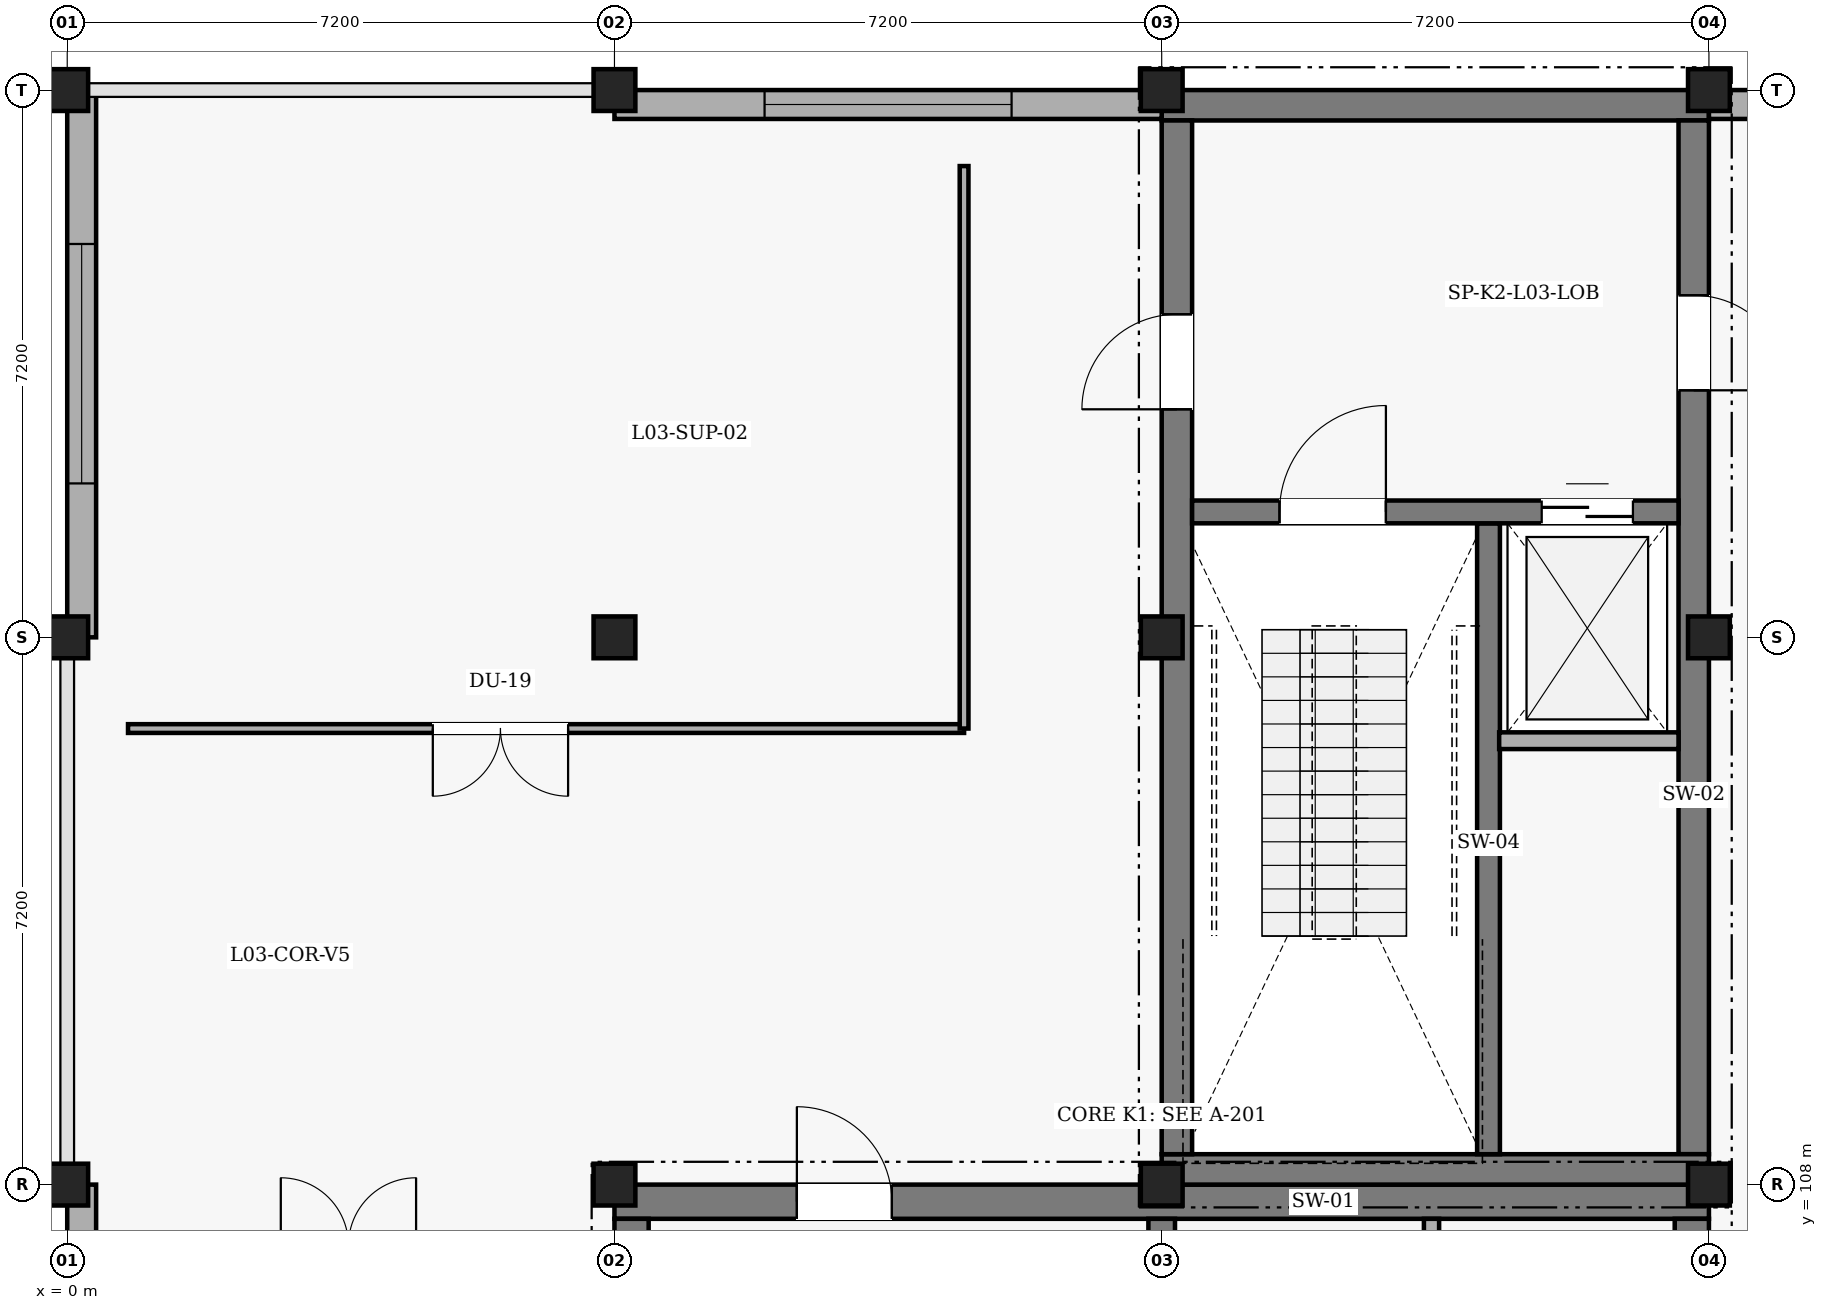
"""IFC4 building model, lengths in metres.
Left out: names, types, materials, properties, quantities, classifications, styles, units other than length and angle.
Written with IfcOpenShell. Run it as: python <this file> out.ifc"""

import sys

from ifc_helpers import new_model, si_unit, direction, frame, frame_2d, origin, origin_2d, place, context, subcontext, project, spatial, rectangle, extrude, element, fill, save


model = new_model("IFC4")
c1 = context("Model", 3, precision=1e-05, world=origin(), true_north=direction((0.0, 1.0)))
c2 = subcontext(c1, "Body", "Model", "MODEL_VIEW")
j1 = project(units=[si_unit("LENGTHUNIT", "METRE"), si_unit("PLANEANGLEUNIT", "RADIAN")], contexts=[c1])
p1 = place(None, origin())
s1 = spatial("IfcSite", under=j1, at=p1, CompositionType="ELEMENT")
p2 = place(p1, origin())
s2 = spatial("IfcBuilding", under=s1, at=p2, CompositionType="ELEMENT")
p3 = place(p2, frame((0.0, 0.0, 13.8)))
s3 = spatial("IfcBuildingStorey", under=s2, at=p3, CompositionType="ELEMENT", Elevation=13.8)
p4 = place(p3, frame((7.2, 107.775, 0.0), z_axis=(0.0, 0.0, 1.0), x_axis=(1.0, 0.0, 0.0)))
e1 = element("IfcWall", 1, at=p4, inside=s3, PredefinedType="SHEAR", context=c2, shape_type="SweptSolid", body=[
    extrude(rectangle(XDim=14.4, YDim=0.45, at=frame_2d((7.2, 0.0))), origin(), (0.0, 0.0, 1.0), 4.2),
])
p5 = place(p4, frame((2.4, 0.0, 0.0)))
e2 = element("IfcOpeningElement", 2, at=p5, cuts=e1, PredefinedType="OPENING", context=c2, shape_type="SweptSolid", body=[
    extrude(rectangle(XDim=1.25, YDim=2.2, at=frame_2d((0.625, 1.1))), frame((0.0, 0.235, 0.0), z_axis=(0.0, -1.0, 0.0), x_axis=(1.0, 0.0, 0.0)), (0.0, 0.0, 1.0), 0.47),
])
p6 = place(p3, frame((21.375, 107.55, 0.0), z_axis=(0.0, 0.0, 1.0), x_axis=(0.0, -1.0, 0.0)))
e3 = element("IfcWall", 3, at=p6, inside=s3, PredefinedType="SHEAR", context=c2, shape_type="SweptSolid", body=[
    extrude(rectangle(XDim=13.5, YDim=0.45, at=frame_2d((6.75, 0.0))), origin(), (0.0, 0.0, 1.0), 4.2),
])
p7 = place(p6, frame((9.8, 0.0, 0.0)))
e4 = element("IfcOpeningElement", 4, at=p7, cuts=e3, PredefinedType="OPENING", context=c2, shape_type="SweptSolid", body=[
    extrude(rectangle(XDim=1.0, YDim=2.15, at=frame_2d((0.5, 1.075))), frame((0.0, 0.235, 0.0), z_axis=(0.0, -1.0, 0.0), x_axis=(1.0, 0.0, 0.0)), (0.0, 0.0, 1.0), 0.47),
])
p8 = place(p6, frame((2.3, 0.0, 0.0)))
e5 = element("IfcOpeningElement", 5, at=p8, cuts=e3, PredefinedType="OPENING", context=c2, shape_type="SweptSolid", body=[
    extrude(rectangle(XDim=1.25, YDim=2.2, at=frame_2d((0.625, 1.1))), frame((0.0, 0.235, 0.0), z_axis=(0.0, -1.0, 0.0), x_axis=(1.0, 0.0, 0.0)), (0.0, 0.0, 1.0), 0.47),
])
p9 = place(p3, frame((7.425, 94.05, 0.0), z_axis=(0.0, 0.0, 1.0), x_axis=(0.0, 1.0, 0.0)))
e6 = element("IfcWall", 6, at=p9, inside=s3, PredefinedType="SHEAR", context=c2, shape_type="SweptSolid", body=[
    extrude(rectangle(XDim=13.5, YDim=0.45, at=frame_2d((6.75, 0.0))), origin(), (0.0, 0.0, 1.0), 4.2),
])
p10 = place(p3, frame((14.4, 107.55, 0.0), z_axis=(0.0, 0.0, 1.0), x_axis=(0.0, -1.0, 0.0)))
e7 = element("IfcWall", 7, at=p10, inside=s3, PredefinedType="SHEAR", context=c2, shape_type="SweptSolid", body=[
    extrude(rectangle(XDim=13.5, YDim=0.35, at=frame_2d((6.75, 0.0))), origin(), (0.0, 0.0, 1.0), 4.2),
])
p11 = place(p10, frame((1.4, 0.0, 0.0)))
e8 = element("IfcOpeningElement", 8, at=p11, cuts=e7, PredefinedType="OPENING", context=c2, shape_type="SweptSolid", body=[
    extrude(rectangle(XDim=1.25, YDim=2.2, at=frame_2d((0.625, 1.1))), frame((0.0, 0.185, 0.0), z_axis=(0.0, -1.0, 0.0), x_axis=(1.0, 0.0, 0.0)), (0.0, 0.0, 1.0), 0.37),
])
p12 = place(p3, frame((14.4, 122.2, 0.0), z_axis=(0.0, 0.0, 1.0), x_axis=(1.0, 0.0, 0.0)))
e9 = element("IfcWall", 9, at=p12, inside=s3, PredefinedType="SHEAR", context=c2, shape_type="SweptSolid", body=[
    extrude(rectangle(XDim=7.2, YDim=0.4, at=frame_2d((3.6, 0.0))), origin(), (0.0, 0.0, 1.0), 4.2),
])
p13 = place(p3, frame((21.4, 122.0, 0.0), z_axis=(0.0, 0.0, 1.0), x_axis=(0.0, -1.0, 0.0)))
e10 = element("IfcWall", 10, at=p13, inside=s3, PredefinedType="SHEAR", context=c2, shape_type="SweptSolid", body=[
    extrude(rectangle(XDim=13.6, YDim=0.4, at=frame_2d((6.8, 0.0))), origin(), (0.0, 0.0, 1.0), 4.2),
])
p14 = place(p13, frame((2.3, 0.0, 0.0)))
e11 = element("IfcOpeningElement", 11, at=p14, cuts=e10, PredefinedType="OPENING", context=c2, shape_type="SweptSolid", body=[
    extrude(rectangle(XDim=1.25, YDim=2.2, at=frame_2d((0.625, 1.1))), frame((0.0, 0.21, 0.0), z_axis=(0.0, -1.0, 0.0), x_axis=(1.0, 0.0, 0.0)), (0.0, 0.0, 1.0), 0.42),
])
p15 = place(p3, frame((21.6, 108.2, 0.0), z_axis=(0.0, 0.0, 1.0), x_axis=(-1.0, 0.0, 0.0)))
e12 = element("IfcWall", 12, at=p15, inside=s3, PredefinedType="SHEAR", context=c2, shape_type="SweptSolid", body=[
    extrude(rectangle(XDim=7.2, YDim=0.4, at=frame_2d((3.6, 0.0))), origin(), (0.0, 0.0, 1.0), 4.2),
])
p16 = place(p3, frame((14.6, 108.4, 0.0), z_axis=(0.0, 0.0, 1.0), x_axis=(0.0, 1.0, 0.0)))
e13 = element("IfcWall", 13, at=p16, inside=s3, PredefinedType="SHEAR", context=c2, shape_type="SweptSolid", body=[
    extrude(rectangle(XDim=13.6, YDim=0.4, at=frame_2d((6.8, 0.0))), origin(), (0.0, 0.0, 1.0), 4.2),
])
p17 = place(p16, frame((9.8, 0.0, 0.0)))
e14 = element("IfcOpeningElement", 14, at=p17, cuts=e13, PredefinedType="OPENING", context=c2, shape_type="SweptSolid", body=[
    extrude(rectangle(XDim=1.25, YDim=2.2, at=frame_2d((0.625, 1.1))), frame((0.0, 0.21, 0.0), z_axis=(0.0, -1.0, 0.0), x_axis=(1.0, 0.0, 0.0)), (0.0, 0.0, 1.0), 0.42),
])
p18 = place(p3, frame((18.7, 116.7, 0.0), z_axis=(0.0, 0.0, 1.0), x_axis=(0.0, -1.0, 0.0)))
e15 = element("IfcWall", 15, at=p18, inside=s3, PredefinedType="SHEAR", context=c2, shape_type="SweptSolid", body=[
    extrude(rectangle(XDim=8.3, YDim=0.3, at=frame_2d((4.15, 0.0))), origin(), (0.0, 0.0, 1.0), 4.2),
])
p19 = place(p3, frame((14.8, 116.85, 0.0), z_axis=(0.0, 0.0, 1.0), x_axis=(1.0, 0.0, 0.0)))
e16 = element("IfcWall", 16, at=p19, inside=s3, PredefinedType="SHEAR", context=c2, shape_type="SweptSolid", body=[
    extrude(rectangle(XDim=6.4, YDim=0.3, at=frame_2d((3.2, 0.0))), origin(), (0.0, 0.0, 1.0), 4.2),
])
p20 = place(p19, frame((1.15, 0.0, 0.0)))
e17 = element("IfcOpeningElement", 17, at=p20, cuts=e16, PredefinedType="OPENING", context=c2, shape_type="SweptSolid", body=[
    extrude(rectangle(XDim=1.4, YDim=2.2, at=frame_2d((0.7, 1.1))), frame((0.0, 0.16, 0.0), z_axis=(0.0, -1.0, 0.0), x_axis=(1.0, 0.0, 0.0)), (0.0, 0.0, 1.0), 0.32),
])
p21 = place(p19, frame((4.6, 0.0, 0.0)))
e18 = element("IfcOpeningElement", 18, at=p21, cuts=e16, PredefinedType="OPENING", context=c2, shape_type="SweptSolid", body=[
    extrude(rectangle(XDim=1.2, YDim=2.15, at=frame_2d((0.6, 1.075))), frame((0.0, 0.16, 0.0), z_axis=(0.0, -1.0, 0.0), x_axis=(1.0, 0.0, 0.0)), (0.0, 0.0, 1.0), 0.32),
])
for number, where, z_axis, x_axis in (
    (19, (0.0, 108.0, 0.0), (0.0, 0.0, 1.0), (1.0, 0.0, 0.0)),
    (20, (0.0, 115.2, 0.0), (0.0, 0.0, 1.0), (1.0, 0.0, 0.0)),
    (21, (0.0, 122.4, 0.0), (0.0, 0.0, 1.0), (1.0, 0.0, 0.0)),
    (22, (7.2, 108.0, 0.0), (0.0, 0.0, 1.0), (1.0, 0.0, 0.0)),
    (23, (7.2, 115.2, 0.0), (0.0, 0.0, 1.0), (1.0, 0.0, 0.0)),
    (24, (7.2, 122.4, 0.0), (0.0, 0.0, 1.0), (1.0, 0.0, 0.0)),
    (25, (14.4, 108.0, 0.0), (0.0, 0.0, 1.0), (1.0, 0.0, 0.0)),
    (26, (14.4, 115.2, 0.0), (0.0, 0.0, 1.0), (1.0, 0.0, 0.0)),
    (27, (14.4, 122.4, 0.0), (0.0, 0.0, 1.0), (1.0, 0.0, 0.0)),
    (28, (21.6, 108.0, 0.0), (0.0, 0.0, 1.0), (1.0, 0.0, 0.0)),
    (29, (21.6, 115.2, 0.0), (0.0, 0.0, 1.0), (1.0, 0.0, 0.0)),
    (30, (21.6, 122.4, 0.0), (0.0, 0.0, 1.0), (1.0, 0.0, 0.0)),
):
    element("IfcColumn", number, at=place(p3, frame(where, z_axis=z_axis, x_axis=x_axis)), inside=s3, PredefinedType="COLUMN", context=c2, shape_type="SweptSolid", body=[
        extrude(rectangle(XDim=0.55, YDim=0.55, at=origin_2d()), origin(), (0.0, 0.0, 1.0), 3.9),
    ])
p22 = place(p3, frame((0.19, 100.8, 0.0), z_axis=(0.0, 0.0, 1.0), x_axis=(0.0, 1.0, 0.0)))
e31 = element("IfcWall", 31, at=p22, inside=s3, PredefinedType="SOLIDWALL", context=c2, shape_type="SweptSolid", body=[
    extrude(rectangle(XDim=7.2, YDim=0.38, at=frame_2d((3.6, 0.0))), origin(), (0.0, 0.0, 1.0), 3.6),
])
p23 = place(p22, frame((2.075, 0.0, 0.9)))
e32 = element("IfcOpeningElement", 32, at=p23, cuts=e31, PredefinedType="OPENING", context=c2, shape_type="SweptSolid", body=[
    extrude(rectangle(XDim=3.05, YDim=1.65, at=frame_2d((1.525, 0.825))), frame((0.0, 0.2, 0.0), z_axis=(0.0, -1.0, 0.0), x_axis=(1.0, 0.0, 0.0)), (0.0, 0.0, 1.0), 0.4),
])
p24 = place(p3, frame((0.19, 115.2, 0.0), z_axis=(0.0, 0.0, 1.0), x_axis=(0.0, 1.0, 0.0)))
e33 = element("IfcWall", 33, at=p24, inside=s3, PredefinedType="SOLIDWALL", context=c2, shape_type="SweptSolid", body=[
    extrude(rectangle(XDim=7.2, YDim=0.38, at=frame_2d((3.6, 0.0))), origin(), (0.0, 0.0, 1.0), 3.6),
])
p25 = place(p24, frame((2.025, 0.0, 0.9)))
e34 = element("IfcOpeningElement", 34, at=p25, cuts=e33, PredefinedType="OPENING", context=c2, shape_type="SweptSolid", body=[
    extrude(rectangle(XDim=3.15, YDim=1.7, at=frame_2d((1.575, 0.85))), frame((0.0, 0.2, 0.0), z_axis=(0.0, -1.0, 0.0), x_axis=(1.0, 0.0, 0.0)), (0.0, 0.0, 1.0), 0.4),
])
p26 = place(p3, frame((7.2, 122.21, 0.0), z_axis=(0.0, 0.0, 1.0), x_axis=(1.0, 0.0, 0.0)))
e35 = element("IfcWall", 35, at=p26, inside=s3, PredefinedType="SOLIDWALL", context=c2, shape_type="SweptSolid", body=[
    extrude(rectangle(XDim=7.2, YDim=0.38, at=frame_2d((3.6, 0.0))), origin(), (0.0, 0.0, 1.0), 3.6),
])
p27 = place(p26, frame((1.975, 0.0, 0.9)))
e36 = element("IfcOpeningElement", 36, at=p27, cuts=e35, PredefinedType="OPENING", context=c2, shape_type="SweptSolid", body=[
    extrude(rectangle(XDim=3.25, YDim=1.75, at=frame_2d((1.625, 0.875))), frame((0.0, 0.2, 0.0), z_axis=(0.0, -1.0, 0.0), x_axis=(1.0, 0.0, 0.0)), (0.0, 0.0, 1.0), 0.4),
])
p28 = place(p3, frame((21.6, 122.21, 0.0), z_axis=(0.0, 0.0, 1.0), x_axis=(1.0, 0.0, 0.0)))
e37 = element("IfcWall", 37, at=p28, inside=s3, PredefinedType="SOLIDWALL", context=c2, shape_type="SweptSolid", body=[
    extrude(rectangle(XDim=7.2, YDim=0.38, at=frame_2d((3.6, 0.0))), origin(), (0.0, 0.0, 1.0), 3.6),
])
p29 = place(p28, frame((1.925, 0.0, 0.9)))
e38 = element("IfcOpeningElement", 38, at=p29, cuts=e37, PredefinedType="OPENING", context=c2, shape_type="SweptSolid", body=[
    extrude(rectangle(XDim=3.35, YDim=1.8, at=frame_2d((1.675, 0.9))), frame((0.0, 0.2, 0.0), z_axis=(0.0, -1.0, 0.0), x_axis=(1.0, 0.0, 0.0)), (0.0, 0.0, 1.0), 0.4),
])
p30 = place(p3, frame((17.95, 102.56, 0.0), z_axis=(0.0, 0.0, 1.0), x_axis=(0.0, 1.0, 0.0)))
e39 = element("IfcWall", 39, at=p30, inside=s3, PredefinedType="PARTITIONING", context=c2, shape_type="SweptSolid", body=[
    extrude(rectangle(XDim=4.99, YDim=0.2, at=frame_2d((2.495, 0.0))), origin(), (0.0, 0.0, 1.0), 3.85),
])
p31 = place(p30, frame((1.6, 0.0, 0.0)))
e40 = element("IfcOpeningElement", 40, at=p31, cuts=e39, PredefinedType="OPENING", context=c2, shape_type="SweptSolid", body=[
    extrude(rectangle(XDim=1.25, YDim=2.2, at=frame_2d((0.625, 1.1))), frame((0.0, 0.11, 0.0), z_axis=(0.0, -1.0, 0.0), x_axis=(1.0, 0.0, 0.0)), (0.0, 0.0, 1.0), 0.22),
])
p32 = place(p3, frame((18.84, 113.84, 0.0), z_axis=(0.0, 0.0, 1.0), x_axis=(1.0, 0.0, 0.0)))
e41 = element("IfcWall", 41, at=p32, inside=s3, PredefinedType="PARTITIONING", context=c2, shape_type="SweptSolid", body=[
    extrude(rectangle(XDim=2.36, YDim=0.22, at=frame_2d((1.18, 0.0))), origin(), (0.0, 0.0, 1.0), 3.85),
])
p33 = place(p3, frame((11.8, 114.0, 0.0), z_axis=(0.0, 0.0, 1.0), x_axis=(-1.0, 0.0, 0.0)))
e42 = element("IfcWall", 42, at=p33, inside=s3, PredefinedType="PARTITIONING", context=c2, shape_type="SweptSolid", body=[
    extrude(rectangle(XDim=11.0, YDim=0.115, at=frame_2d((5.5, 0.0))), origin(), (0.0, 0.0, 1.0), 3.45),
])
p34 = place(p33, frame((5.21, 0.0, 0.0)))
e43 = element("IfcOpeningElement", 43, at=p34, cuts=e42, PredefinedType="OPENING", context=c2, shape_type="SweptSolid", body=[
    extrude(rectangle(XDim=1.78, YDim=2.28, at=frame_2d((0.89, 1.14))), frame((0.0, 0.067, 0.0), z_axis=(0.0, -1.0, 0.0), x_axis=(1.0, 0.0, 0.0)), (0.0, 0.0, 1.0), 0.135),
])
p35 = place(p3, frame((11.8, 121.4, 0.0), z_axis=(0.0, 0.0, 1.0), x_axis=(0.0, -1.0, 0.0)))
e44 = element("IfcWall", 44, at=p35, inside=s3, PredefinedType="PARTITIONING", context=c2, shape_type="SweptSolid", body=[
    extrude(rectangle(XDim=7.4, YDim=0.115, at=frame_2d((3.7, 0.0))), origin(), (0.0, 0.0, 1.0), 3.45),
])
p36 = place(p25, origin())
e45 = element("IfcWindow", 45, at=p36, inside=s3, PartitioningType="SINGLE_PANEL", PredefinedType="WINDOW", context=c2, shape_type="SweptSolid", body=[
    extrude(rectangle(XDim=3.15, YDim=1.7, at=frame_2d((1.575, 0.85))), frame((0.0, 0.03, 0.0), z_axis=(0.0, -1.0, 0.0), x_axis=(1.0, 0.0, 0.0)), (0.0, 0.0, 1.0), 0.06),
])
fill(e34, e45)
p37 = place(p27, origin())
e46 = element("IfcWindow", 46, at=p37, inside=s3, PartitioningType="SINGLE_PANEL", PredefinedType="WINDOW", context=c2, shape_type="SweptSolid", body=[
    extrude(rectangle(XDim=3.25, YDim=1.75, at=frame_2d((1.625, 0.875))), frame((0.0, 0.03, 0.0), z_axis=(0.0, -1.0, 0.0), x_axis=(1.0, 0.0, 0.0)), (0.0, 0.0, 1.0), 0.06),
])
fill(e36, e46)
p38 = place(p5, origin())
e47 = element("IfcDoor", 47, at=p38, inside=s3, OperationType="SINGLE_SWING_LEFT", PredefinedType="DOOR", context=c2, shape_type="SweptSolid", body=[
    extrude(rectangle(XDim=1.25, YDim=2.2, at=frame_2d((0.625, 1.1))), frame((0.0, 0.025, 0.0), z_axis=(0.0, -1.0, 0.0), x_axis=(1.0, 0.0, 0.0)), (0.0, 0.0, 1.0), 0.05),
])
fill(e2, e47)
p39 = place(p20, origin())
e48 = element("IfcDoor", 48, at=p39, inside=s3, OperationType="SINGLE_SWING_RIGHT", PredefinedType="DOOR", context=c2, shape_type="SweptSolid", body=[
    extrude(rectangle(XDim=1.4, YDim=2.2, at=frame_2d((0.7, 1.1))), frame((0.0, 0.025, 0.0), z_axis=(0.0, -1.0, 0.0), x_axis=(1.0, 0.0, 0.0)), (0.0, 0.0, 1.0), 0.05),
])
fill(e17, e48)
p40 = place(p21, origin())
e49 = element("IfcDoor", 49, at=p40, inside=s3, OperationType="DOUBLE_DOOR_SLIDING", PredefinedType="DOOR", context=c2, shape_type="SweptSolid", body=[
    extrude(rectangle(XDim=1.2, YDim=2.15, at=frame_2d((0.6, 1.075))), frame((0.0, 0.025, 0.0), z_axis=(0.0, -1.0, 0.0), x_axis=(1.0, 0.0, 0.0)), (0.0, 0.0, 1.0), 0.05),
])
fill(e18, e49)
p41 = place(p17, origin())
e50 = element("IfcDoor", 50, at=p41, inside=s3, OperationType="SINGLE_SWING_LEFT", PredefinedType="DOOR", context=c2, shape_type="SweptSolid", body=[
    extrude(rectangle(XDim=1.25, YDim=2.2, at=frame_2d((0.625, 1.1))), frame((0.0, 0.025, 0.0), z_axis=(0.0, -1.0, 0.0), x_axis=(1.0, 0.0, 0.0)), (0.0, 0.0, 1.0), 0.05),
])
fill(e14, e50)
p42 = place(p14, origin())
e51 = element("IfcDoor", 51, at=p42, inside=s3, OperationType="SINGLE_SWING_RIGHT", PredefinedType="DOOR", context=c2, shape_type="SweptSolid", body=[
    extrude(rectangle(XDim=1.25, YDim=2.2, at=frame_2d((0.625, 1.1))), frame((0.0, 0.025, 0.0), z_axis=(0.0, -1.0, 0.0), x_axis=(1.0, 0.0, 0.0)), (0.0, 0.0, 1.0), 0.05),
])
fill(e11, e51)
p43 = place(p34, origin())
e52 = element("IfcDoor", 52, at=p43, inside=s3, OperationType="DOUBLE_DOOR_SINGLE_SWING", PredefinedType="DOOR", context=c2, shape_type="SweptSolid", body=[
    extrude(rectangle(XDim=1.78, YDim=2.28, at=frame_2d((0.89, 1.14))), frame((0.0, 0.025, 0.0), z_axis=(0.0, -1.0, 0.0), x_axis=(1.0, 0.0, 0.0)), (0.0, 0.0, 1.0), 0.05),
])
fill(e43, e52)
save(model, sys.argv[1])
